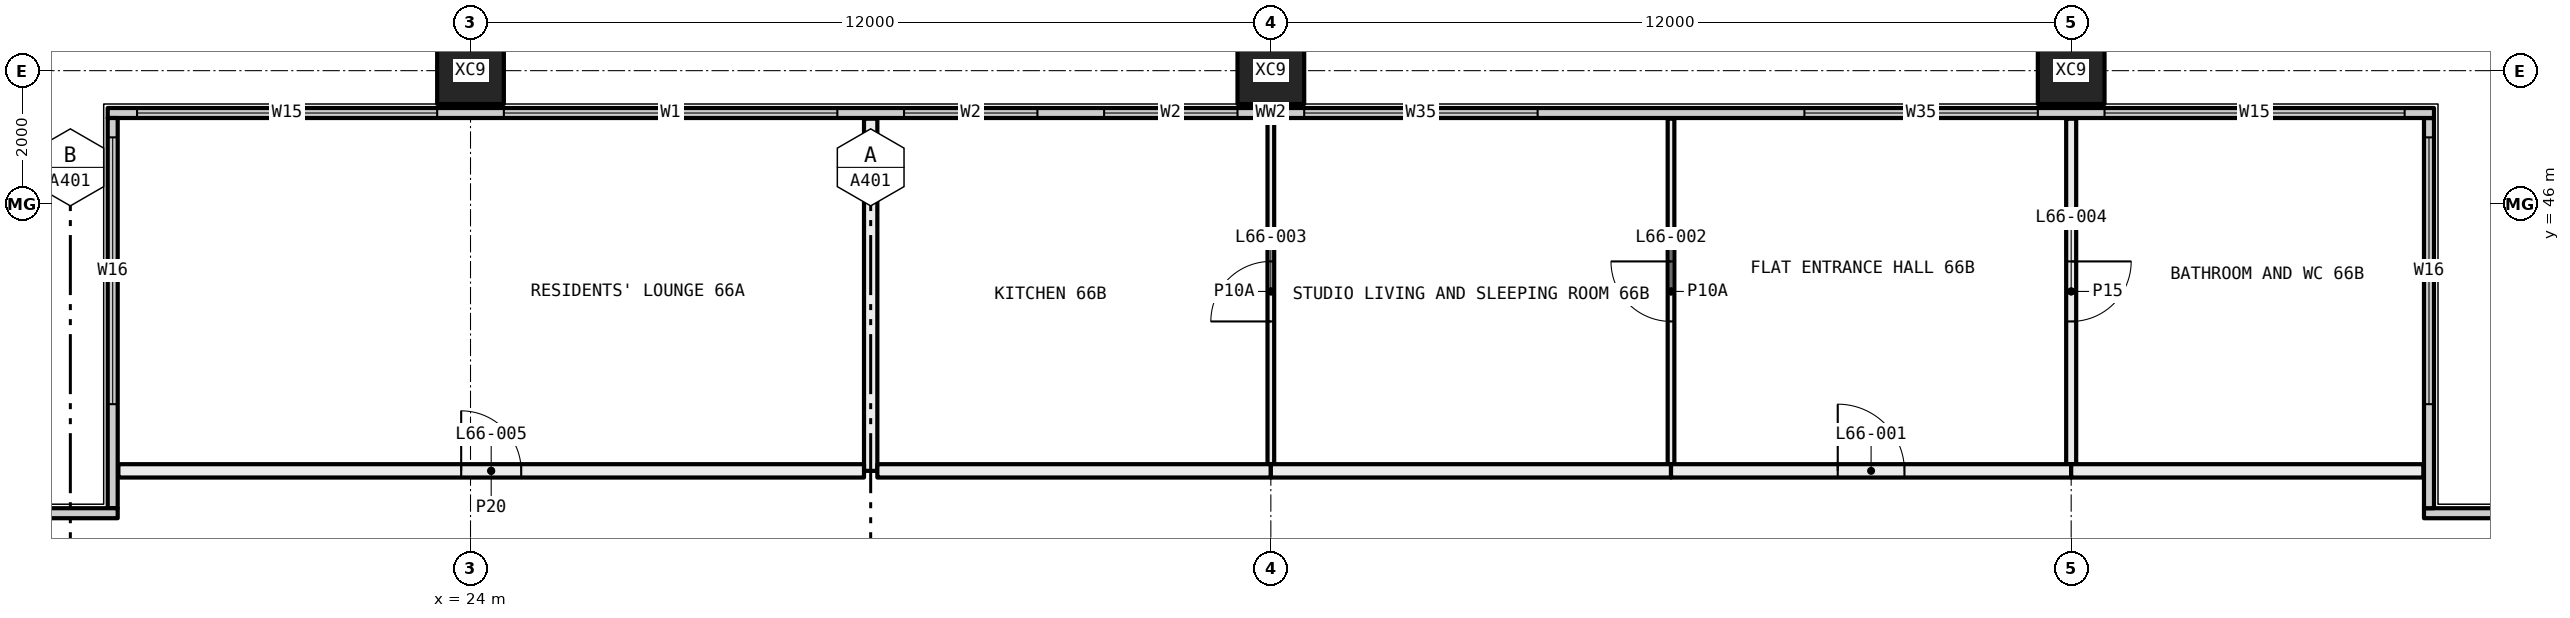
"""IFC4 building model, lengths in metres.
Left out: names, types, materials, properties, quantities, classifications, styles, units other than length and angle.
Written with IfcOpenShell. Run it as: python <this file> out.ifc"""

import sys

from ifc_helpers import new_model, si_unit, direction, frame, frame_2d, origin, origin_2d, place, context, subcontext, project, spatial, rectangle, hollow_rectangle, extrude, element, fill, save


model = new_model("IFC4")
c1 = context("Model", 3, precision=1e-05, world=origin(), true_north=direction((0.0, 1.0)))
c2 = subcontext(c1, "Body", "Model", "MODEL_VIEW")
j1 = project(units=[si_unit("LENGTHUNIT", "METRE"), si_unit("PLANEANGLEUNIT", "RADIAN")], contexts=[c1])
p1 = place(None, origin())
s1 = spatial("IfcSite", under=j1, at=p1, CompositionType="ELEMENT")
p2 = place(p1, origin())
s2 = spatial("IfcBuilding", under=s1, at=p2, CompositionType="ELEMENT")
p3 = place(p2, frame((0.0, 0.0, 245.55)))
s3 = spatial("IfcBuildingStorey", under=s2, at=p3, CompositionType="ELEMENT", Elevation=245.55)
for number, where, z_axis, x_axis in (
    (1, (24.0, 48.0, -0.4), (0.0, 0.0, 1.0), (1.0, 0.0, 0.0)),
    (2, (36.0, 48.0, -0.4), (0.0, 0.0, 1.0), (1.0, 0.0, 0.0)),
    (3, (48.0, 48.0, -0.4), (0.0, 0.0, 1.0), (1.0, 0.0, 0.0)),
):
    element("IfcColumn", number, at=place(p3, frame(where, z_axis=z_axis, x_axis=x_axis)), inside=s3, PredefinedType="COLUMN", context=c2, shape_type="SweptSolid", body=[
        extrude(hollow_rectangle(XDim=1.0, YDim=1.0, WallThickness=0.036, at=origin_2d()), origin(), (0.0, 0.0, 1.0), 3.45),
    ])
p4 = place(p3, frame((53.29, 41.365, 0.0), z_axis=(0.0, 0.0, 1.0), x_axis=(1.0, 0.0, 0.0)))
e4 = element("IfcWall", 4, at=p4, inside=s3, PredefinedType="ELEMENTEDWALL", context=c2, shape_type="SweptSolid", body=[
    extrude(rectangle(XDim=6.15, YDim=0.15, at=frame_2d((3.075, 0.0))), origin(), (0.0, 0.0, 1.0), 3.05),
])
p5 = place(p4, frame((1.71, 0.0, 0.45)))
e5 = element("IfcOpeningElement", 5, at=p5, cuts=e4, PredefinedType="OPENING", context=c2, shape_type="SweptSolid", body=[
    extrude(rectangle(XDim=4.0, YDim=2.55, at=frame_2d((2.0, 1.275))), frame((0.0, 0.085, 0.0), z_axis=(0.0, -1.0, 0.0), x_axis=(1.0, 0.0, 0.0)), (0.0, 0.0, 1.0), 0.17),
])
p6 = place(p3, frame((53.365, 41.44, 0.0), z_axis=(0.0, 0.0, 1.0), x_axis=(0.0, 1.0, 0.0)))
e6 = element("IfcWall", 6, at=p6, inside=s3, PredefinedType="ELEMENTEDWALL", context=c2, shape_type="SweptSolid", body=[
    extrude(rectangle(XDim=5.85, YDim=0.15, at=frame_2d((2.925, 0.0))), origin(), (0.0, 0.0, 1.0), 3.05),
])
p7 = place(p6, frame((1.56, 0.0, 0.45)))
e7 = element("IfcOpeningElement", 7, at=p7, cuts=e6, PredefinedType="OPENING", context=c2, shape_type="SweptSolid", body=[
    extrude(rectangle(XDim=4.0, YDim=2.55, at=frame_2d((2.0, 1.275))), frame((0.0, 0.085, 0.0), z_axis=(0.0, -1.0, 0.0), x_axis=(1.0, 0.0, 0.0)), (0.0, 0.0, 1.0), 0.17),
])
p8 = place(p3, frame((18.56, 47.365, 0.0), z_axis=(0.0, 0.0, 1.0), x_axis=(1.0, 0.0, 0.0)))
e8 = element("IfcWall", 8, at=p8, inside=s3, PredefinedType="ELEMENTEDWALL", context=c2, shape_type="SweptSolid", body=[
    extrude(rectangle(XDim=34.88, YDim=0.15, at=frame_2d((17.44, 0.0))), origin(), (0.0, 0.0, 1.0), 3.05),
])
p9 = place(p8, frame((0.44, 0.0, 0.45)))
e9 = element("IfcOpeningElement", 9, at=p9, cuts=e8, PredefinedType="OPENING", context=c2, shape_type="SweptSolid", body=[
    extrude(rectangle(XDim=4.5, YDim=2.55, at=frame_2d((2.25, 1.275))), frame((0.0, 0.085, 0.0), z_axis=(0.0, -1.0, 0.0), x_axis=(1.0, 0.0, 0.0)), (0.0, 0.0, 1.0), 0.17),
])
p10 = place(p8, frame((5.94, 0.0, 0.45)))
e10 = element("IfcOpeningElement", 10, at=p10, cuts=e8, PredefinedType="OPENING", context=c2, shape_type="SweptSolid", body=[
    extrude(rectangle(XDim=5.0, YDim=2.55, at=frame_2d((2.5, 1.275))), frame((0.0, 0.085, 0.0), z_axis=(0.0, -1.0, 0.0), x_axis=(1.0, 0.0, 0.0)), (0.0, 0.0, 1.0), 0.17),
])
p11 = place(p8, frame((11.94, 0.0, 0.45)))
e11 = element("IfcOpeningElement", 11, at=p11, cuts=e8, PredefinedType="OPENING", context=c2, shape_type="SweptSolid", body=[
    extrude(rectangle(XDim=2.0, YDim=2.55, at=frame_2d((1.0, 1.275))), frame((0.0, 0.085, 0.0), z_axis=(0.0, -1.0, 0.0), x_axis=(1.0, 0.0, 0.0)), (0.0, 0.0, 1.0), 0.17),
])
p12 = place(p8, frame((14.94, 0.0, 0.45)))
e12 = element("IfcOpeningElement", 12, at=p12, cuts=e8, PredefinedType="OPENING", context=c2, shape_type="SweptSolid", body=[
    extrude(rectangle(XDim=2.0, YDim=2.55, at=frame_2d((1.0, 1.275))), frame((0.0, 0.085, 0.0), z_axis=(0.0, -1.0, 0.0), x_axis=(1.0, 0.0, 0.0)), (0.0, 0.0, 1.0), 0.17),
])
p13 = place(p8, frame((17.94, 0.0, 0.45)))
e13 = element("IfcOpeningElement", 13, at=p13, cuts=e8, PredefinedType="OPENING", context=c2, shape_type="SweptSolid", body=[
    extrude(rectangle(XDim=3.5, YDim=2.55, at=frame_2d((1.75, 1.275))), frame((0.0, 0.085, 0.0), z_axis=(0.0, -1.0, 0.0), x_axis=(1.0, 0.0, 0.0)), (0.0, 0.0, 1.0), 0.17),
])
p14 = place(p8, frame((25.44, 0.0, 0.45)))
e14 = element("IfcOpeningElement", 14, at=p14, cuts=e8, PredefinedType="OPENING", context=c2, shape_type="SweptSolid", body=[
    extrude(rectangle(XDim=3.5, YDim=2.55, at=frame_2d((1.75, 1.275))), frame((0.0, 0.085, 0.0), z_axis=(0.0, -1.0, 0.0), x_axis=(1.0, 0.0, 0.0)), (0.0, 0.0, 1.0), 0.17),
])
p15 = place(p8, frame((29.94, 0.0, 0.45)))
e15 = element("IfcOpeningElement", 15, at=p15, cuts=e8, PredefinedType="OPENING", context=c2, shape_type="SweptSolid", body=[
    extrude(rectangle(XDim=4.5, YDim=2.55, at=frame_2d((2.25, 1.275))), frame((0.0, 0.085, 0.0), z_axis=(0.0, -1.0, 0.0), x_axis=(1.0, 0.0, 0.0)), (0.0, 0.0, 1.0), 0.17),
])
p16 = place(p3, frame((18.635, 41.44, 0.0), z_axis=(0.0, 0.0, 1.0), x_axis=(0.0, 1.0, 0.0)))
e16 = element("IfcWall", 16, at=p16, inside=s3, PredefinedType="ELEMENTEDWALL", context=c2, shape_type="SweptSolid", body=[
    extrude(rectangle(XDim=5.85, YDim=0.15, at=frame_2d((2.925, 0.0))), origin(), (0.0, 0.0, 1.0), 3.05),
])
p17 = place(p16, frame((1.56, 0.0, 0.45)))
e17 = element("IfcOpeningElement", 17, at=p17, cuts=e16, PredefinedType="OPENING", context=c2, shape_type="SweptSolid", body=[
    extrude(rectangle(XDim=4.0, YDim=2.55, at=frame_2d((2.0, 1.275))), frame((0.0, 0.085, 0.0), z_axis=(0.0, -1.0, 0.0), x_axis=(1.0, 0.0, 0.0)), (0.0, 0.0, 1.0), 0.17),
])
p18 = place(p3, frame((12.56, 41.365, 0.0), z_axis=(0.0, 0.0, 1.0), x_axis=(1.0, 0.0, 0.0)))
e18 = element("IfcWall", 18, at=p18, inside=s3, PredefinedType="ELEMENTEDWALL", context=c2, shape_type="SweptSolid", body=[
    extrude(rectangle(XDim=6.15, YDim=0.15, at=frame_2d((3.075, 0.0))), origin(), (0.0, 0.0, 1.0), 3.05),
])
p19 = place(p18, frame((0.44, 0.0, 0.45)))
e19 = element("IfcOpeningElement", 19, at=p19, cuts=e18, PredefinedType="OPENING", context=c2, shape_type="SweptSolid", body=[
    extrude(rectangle(XDim=4.0, YDim=2.55, at=frame_2d((2.0, 1.275))), frame((0.0, 0.085, 0.0), z_axis=(0.0, -1.0, 0.0), x_axis=(1.0, 0.0, 0.0)), (0.0, 0.0, 1.0), 0.17),
])
p20 = place(p3, frame((30.0, 42.0, 0.0), z_axis=(0.0, 0.0, 1.0), x_axis=(0.0, 1.0, 0.0)))
e20 = element("IfcWall", 20, at=p20, inside=s3, PredefinedType="PARTITIONING", context=c2, shape_type="SweptSolid", body=[
    extrude(rectangle(XDim=5.28, YDim=0.2, at=frame_2d((2.64, 0.0))), origin(), (0.0, 0.0, 1.0), 3.05),
])
p21 = place(p3, frame((18.72, 42.0, 0.0), z_axis=(0.0, 0.0, 1.0), x_axis=(1.0, 0.0, 0.0)))
e21 = element("IfcWall", 21, at=p21, inside=s3, PredefinedType="PARTITIONING", context=c2, shape_type="SweptSolid", body=[
    extrude(rectangle(XDim=11.18, YDim=0.2, at=frame_2d((5.59, 0.0))), origin(), (0.0, 0.0, 1.0), 3.05),
])
p22 = place(p21, frame((5.14, 0.0, 0.0)))
e22 = element("IfcOpeningElement", 22, at=p22, cuts=e21, PredefinedType="OPENING", context=c2, shape_type="SweptSolid", body=[
    extrude(rectangle(XDim=0.9, YDim=2.1, at=frame_2d((0.45, 1.05))), frame((0.0, 0.11, 0.0), z_axis=(0.0, -1.0, 0.0), x_axis=(1.0, 0.0, 0.0)), (0.0, 0.0, 1.0), 0.22),
])
p23 = place(p3, frame((36.0, 42.1, 0.0), z_axis=(0.0, 0.0, 1.0), x_axis=(0.0, 1.0, 0.0)))
e23 = element("IfcWall", 23, at=p23, inside=s3, PredefinedType="PARTITIONING", context=c2, shape_type="SweptSolid", body=[
    extrude(rectangle(XDim=5.18, YDim=0.1, at=frame_2d((2.59, 0.0))), origin(), (0.0, 0.0, 1.0), 2.45),
])
p24 = place(p23, frame((2.14, 0.0, 0.0)))
e24 = element("IfcOpeningElement", 24, at=p24, cuts=e23, PredefinedType="OPENING", context=c2, shape_type="SweptSolid", body=[
    extrude(rectangle(XDim=0.9, YDim=2.1, at=frame_2d((0.45, 1.05))), frame((0.0, 0.06, 0.0), z_axis=(0.0, -1.0, 0.0), x_axis=(1.0, 0.0, 0.0)), (0.0, 0.0, 1.0), 0.12),
])
p25 = place(p3, frame((30.1, 42.0, 0.0), z_axis=(0.0, 0.0, 1.0), x_axis=(1.0, 0.0, 0.0)))
e25 = element("IfcWall", 25, at=p25, inside=s3, PredefinedType="PARTITIONING", context=c2, shape_type="SweptSolid", body=[
    extrude(rectangle(XDim=5.9, YDim=0.2, at=frame_2d((2.95, 0.0))), origin(), (0.0, 0.0, 1.0), 2.45),
])
p26 = place(p3, frame((42.0, 42.1, 0.0), z_axis=(0.0, 0.0, 1.0), x_axis=(0.0, 1.0, 0.0)))
e26 = element("IfcWall", 26, at=p26, inside=s3, PredefinedType="PARTITIONING", context=c2, shape_type="SweptSolid", body=[
    extrude(rectangle(XDim=5.18, YDim=0.1, at=frame_2d((2.59, 0.0))), origin(), (0.0, 0.0, 1.0), 3.05),
])
p27 = place(p26, frame((2.14, 0.0, 0.0)))
e27 = element("IfcOpeningElement", 27, at=p27, cuts=e26, PredefinedType="OPENING", context=c2, shape_type="SweptSolid", body=[
    extrude(rectangle(XDim=0.9, YDim=2.1, at=frame_2d((0.45, 1.05))), frame((0.0, 0.06, 0.0), z_axis=(0.0, -1.0, 0.0), x_axis=(1.0, 0.0, 0.0)), (0.0, 0.0, 1.0), 0.12),
])
p28 = place(p3, frame((36.0, 42.0, 0.0), z_axis=(0.0, 0.0, 1.0), x_axis=(1.0, 0.0, 0.0)))
e28 = element("IfcWall", 28, at=p28, inside=s3, PredefinedType="PARTITIONING", context=c2, shape_type="SweptSolid", body=[
    extrude(rectangle(XDim=6.0, YDim=0.2, at=frame_2d((3.0, 0.0))), origin(), (0.0, 0.0, 1.0), 2.45),
])
p29 = place(p3, frame((48.0, 42.1, 0.0), z_axis=(0.0, 0.0, 1.0), x_axis=(0.0, 1.0, 0.0)))
e29 = element("IfcWall", 29, at=p29, inside=s3, PredefinedType="PARTITIONING", context=c2, shape_type="SweptSolid", body=[
    extrude(rectangle(XDim=5.18, YDim=0.15, at=frame_2d((2.59, 0.0))), origin(), (0.0, 0.0, 1.0), 3.05),
])
p30 = place(p29, frame((2.14, 0.0, 0.0)))
e30 = element("IfcOpeningElement", 30, at=p30, cuts=e29, PredefinedType="OPENING", context=c2, shape_type="SweptSolid", body=[
    extrude(rectangle(XDim=0.9, YDim=2.1, at=frame_2d((0.45, 1.05))), frame((0.0, 0.085, 0.0), z_axis=(0.0, -1.0, 0.0), x_axis=(1.0, 0.0, 0.0)), (0.0, 0.0, 1.0), 0.17),
])
p31 = place(p3, frame((42.0, 42.0, 0.0), z_axis=(0.0, 0.0, 1.0), x_axis=(1.0, 0.0, 0.0)))
e31 = element("IfcWall", 31, at=p31, inside=s3, PredefinedType="PARTITIONING", context=c2, shape_type="SweptSolid", body=[
    extrude(rectangle(XDim=6.0, YDim=0.2, at=frame_2d((3.0, 0.0))), origin(), (0.0, 0.0, 1.0), 3.05),
])
p32 = place(p31, frame((2.5, 0.0, 0.0)))
e32 = element("IfcOpeningElement", 32, at=p32, cuts=e31, PredefinedType="OPENING", context=c2, shape_type="SweptSolid", body=[
    extrude(rectangle(XDim=1.0, YDim=2.1, at=frame_2d((0.5, 1.05))), frame((0.0, 0.11, 0.0), z_axis=(0.0, -1.0, 0.0), x_axis=(1.0, 0.0, 0.0)), (0.0, 0.0, 1.0), 0.22),
])
p33 = place(p3, frame((48.0, 42.0, 0.0), z_axis=(0.0, 0.0, 1.0), x_axis=(1.0, 0.0, 0.0)))
e33 = element("IfcWall", 33, at=p33, inside=s3, PredefinedType="PARTITIONING", context=c2, shape_type="SweptSolid", body=[
    extrude(rectangle(XDim=5.28, YDim=0.2, at=frame_2d((2.64, 0.0))), origin(), (0.0, 0.0, 1.0), 3.05),
])
p34 = place(p7, origin())
e34 = element("IfcWindow", 34, at=p34, inside=s3, PartitioningType="SINGLE_PANEL", PredefinedType="WINDOW", context=c2, shape_type="SweptSolid", body=[
    extrude(rectangle(XDim=4.0, YDim=2.55, at=frame_2d((2.0, 1.275))), frame((0.0, 0.03, 0.0), z_axis=(0.0, -1.0, 0.0), x_axis=(1.0, 0.0, 0.0)), (0.0, 0.0, 1.0), 0.06),
])
fill(e7, e34)
p35 = place(p9, origin())
e35 = element("IfcWindow", 35, at=p35, inside=s3, PartitioningType="SINGLE_PANEL", PredefinedType="WINDOW", context=c2, shape_type="SweptSolid", body=[
    extrude(rectangle(XDim=4.5, YDim=2.55, at=frame_2d((2.25, 1.275))), frame((0.0, 0.03, 0.0), z_axis=(0.0, -1.0, 0.0), x_axis=(1.0, 0.0, 0.0)), (0.0, 0.0, 1.0), 0.06),
])
fill(e9, e35)
p36 = place(p10, origin())
e36 = element("IfcWindow", 36, at=p36, inside=s3, PartitioningType="SINGLE_PANEL", PredefinedType="WINDOW", context=c2, shape_type="SweptSolid", body=[
    extrude(rectangle(XDim=5.0, YDim=2.55, at=frame_2d((2.5, 1.275))), frame((0.0, 0.03, 0.0), z_axis=(0.0, -1.0, 0.0), x_axis=(1.0, 0.0, 0.0)), (0.0, 0.0, 1.0), 0.06),
])
fill(e10, e36)
p37 = place(p11, origin())
e37 = element("IfcWindow", 37, at=p37, inside=s3, PartitioningType="SINGLE_PANEL", PredefinedType="WINDOW", context=c2, shape_type="SweptSolid", body=[
    extrude(rectangle(XDim=2.0, YDim=2.55, at=frame_2d((1.0, 1.275))), frame((0.0, 0.03, 0.0), z_axis=(0.0, -1.0, 0.0), x_axis=(1.0, 0.0, 0.0)), (0.0, 0.0, 1.0), 0.06),
])
fill(e11, e37)
p38 = place(p12, origin())
e38 = element("IfcWindow", 38, at=p38, inside=s3, PartitioningType="SINGLE_PANEL", PredefinedType="WINDOW", context=c2, shape_type="SweptSolid", body=[
    extrude(rectangle(XDim=2.0, YDim=2.55, at=frame_2d((1.0, 1.275))), frame((0.0, 0.03, 0.0), z_axis=(0.0, -1.0, 0.0), x_axis=(1.0, 0.0, 0.0)), (0.0, 0.0, 1.0), 0.06),
])
fill(e12, e38)
p39 = place(p13, origin())
e39 = element("IfcWindow", 39, at=p39, inside=s3, PartitioningType="SINGLE_PANEL", PredefinedType="WINDOW", context=c2, shape_type="SweptSolid", body=[
    extrude(rectangle(XDim=3.5, YDim=2.55, at=frame_2d((1.75, 1.275))), frame((0.0, 0.03, 0.0), z_axis=(0.0, -1.0, 0.0), x_axis=(1.0, 0.0, 0.0)), (0.0, 0.0, 1.0), 0.06),
])
fill(e13, e39)
p40 = place(p14, origin())
e40 = element("IfcWindow", 40, at=p40, inside=s3, PartitioningType="SINGLE_PANEL", PredefinedType="WINDOW", context=c2, shape_type="SweptSolid", body=[
    extrude(rectangle(XDim=3.5, YDim=2.55, at=frame_2d((1.75, 1.275))), frame((0.0, 0.03, 0.0), z_axis=(0.0, -1.0, 0.0), x_axis=(1.0, 0.0, 0.0)), (0.0, 0.0, 1.0), 0.06),
])
fill(e14, e40)
p41 = place(p15, origin())
e41 = element("IfcWindow", 41, at=p41, inside=s3, PartitioningType="SINGLE_PANEL", PredefinedType="WINDOW", context=c2, shape_type="SweptSolid", body=[
    extrude(rectangle(XDim=4.5, YDim=2.55, at=frame_2d((2.25, 1.275))), frame((0.0, 0.03, 0.0), z_axis=(0.0, -1.0, 0.0), x_axis=(1.0, 0.0, 0.0)), (0.0, 0.0, 1.0), 0.06),
])
fill(e15, e41)
p42 = place(p17, origin())
e42 = element("IfcWindow", 42, at=p42, inside=s3, PartitioningType="SINGLE_PANEL", PredefinedType="WINDOW", context=c2, shape_type="SweptSolid", body=[
    extrude(rectangle(XDim=4.0, YDim=2.55, at=frame_2d((2.0, 1.275))), frame((0.0, 0.03, 0.0), z_axis=(0.0, -1.0, 0.0), x_axis=(1.0, 0.0, 0.0)), (0.0, 0.0, 1.0), 0.06),
])
fill(e17, e42)
p43 = place(p32, origin())
e43 = element("IfcDoor", 43, at=p43, inside=s3, OperationType="SINGLE_SWING_RIGHT", PredefinedType="DOOR", context=c2, shape_type="SweptSolid", body=[
    extrude(rectangle(XDim=1.0, YDim=2.1, at=frame_2d((0.5, 1.05))), frame((0.0, 0.025, 0.0), z_axis=(0.0, -1.0, 0.0), x_axis=(1.0, 0.0, 0.0)), (0.0, 0.0, 1.0), 0.05),
])
fill(e32, e43)
p44 = place(p27, origin())
e44 = element("IfcDoor", 44, at=p44, inside=s3, OperationType="SINGLE_SWING_LEFT", PredefinedType="DOOR", context=c2, shape_type="SweptSolid", body=[
    extrude(rectangle(XDim=0.9, YDim=2.1, at=frame_2d((0.45, 1.05))), frame((0.0, 0.025, 0.0), z_axis=(0.0, -1.0, 0.0), x_axis=(1.0, 0.0, 0.0)), (0.0, 0.0, 1.0), 0.05),
])
fill(e27, e44)
p45 = place(p24, origin())
e45 = element("IfcDoor", 45, at=p45, inside=s3, OperationType="SINGLE_SWING_RIGHT", PredefinedType="DOOR", context=c2, shape_type="SweptSolid", body=[
    extrude(rectangle(XDim=0.9, YDim=2.1, at=frame_2d((0.45, 1.05))), frame((0.0, 0.025, 0.0), z_axis=(0.0, -1.0, 0.0), x_axis=(1.0, 0.0, 0.0)), (0.0, 0.0, 1.0), 0.05),
])
fill(e24, e45)
p46 = place(p30, frame((0.9, 0.0, 0.0), x_axis=(-1.0, 0.0, 0.0)))
e46 = element("IfcDoor", 46, at=p46, inside=s3, OperationType="SINGLE_SWING_RIGHT", PredefinedType="DOOR", context=c2, shape_type="SweptSolid", body=[
    extrude(rectangle(XDim=0.9, YDim=2.1, at=frame_2d((0.45, 1.05))), frame((0.0, 0.025, 0.0), z_axis=(0.0, -1.0, 0.0), x_axis=(1.0, 0.0, 0.0)), (0.0, 0.0, 1.0), 0.05),
])
fill(e30, e46)
p47 = place(p22, origin())
e47 = element("IfcDoor", 47, at=p47, inside=s3, OperationType="SINGLE_SWING_RIGHT", PredefinedType="DOOR", context=c2, shape_type="SweptSolid", body=[
    extrude(rectangle(XDim=0.9, YDim=2.1, at=frame_2d((0.45, 1.05))), frame((0.0, 0.025, 0.0), z_axis=(0.0, -1.0, 0.0), x_axis=(1.0, 0.0, 0.0)), (0.0, 0.0, 1.0), 0.05),
])
fill(e22, e47)
save(model, sys.argv[1])
